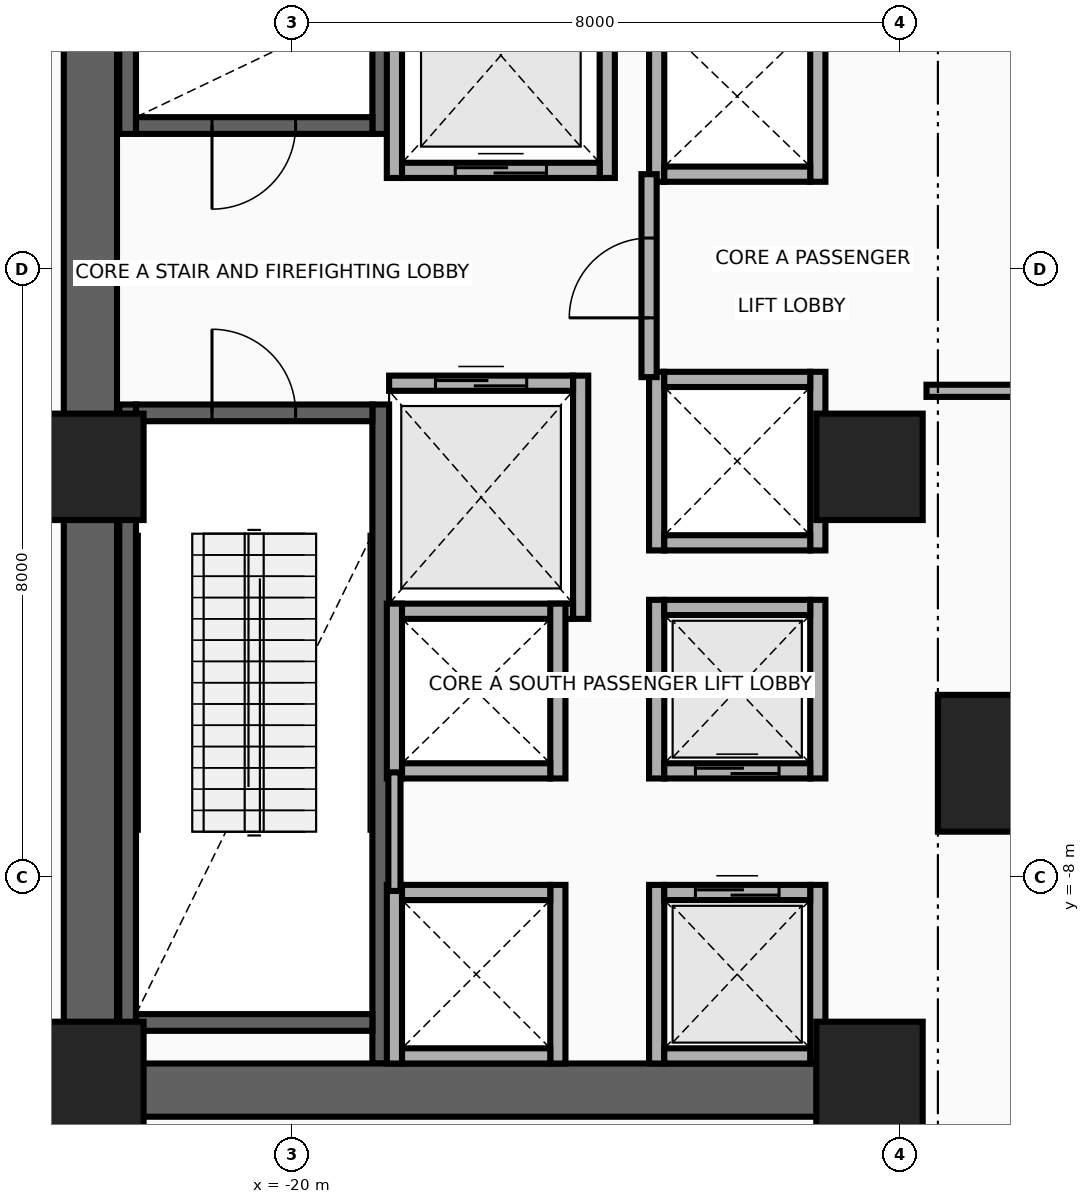
"""IFC4 building model, lengths in metres.
Left out: names, types, materials, properties, quantities, classifications, styles, units other than length and angle.
Written with IfcOpenShell. Run it as: python <this file> out.ifc"""

import sys

from ifc_helpers import new_model, si_unit, direction, frame, frame_2d, origin, origin_2d, place, context, subcontext, project, spatial, rectangle, extrude, source, transform, mapped, element, fill, save


model = new_model("IFC4")
c1 = context("Model", 3, precision=1e-05, world=origin(), true_north=direction((0.0, 1.0)))
c2 = subcontext(c1, "Body", "Model", "MODEL_VIEW")
j1 = project(units=[si_unit("LENGTHUNIT", "METRE"), si_unit("PLANEANGLEUNIT", "RADIAN")], contexts=[c1])
p1 = place(None, origin())
s1 = spatial("IfcSite", under=j1, at=p1, CompositionType="ELEMENT")
p2 = place(p1, origin())
s2 = spatial("IfcBuilding", under=s1, at=p2, CompositionType="ELEMENT")
p3 = place(p2, frame((0.0, 0.0, 20.8)))
s3 = spatial("IfcBuildingStorey", under=s2, at=p3, CompositionType="ELEMENT", Elevation=20.8)
for number, where, z_axis, x_axis in (
    (1, (-22.16, 1.78, 0.0), (0.0, 0.0, 1.0), (0.0, 1.0, 0.0)),
    (2, (-18.83, 1.78, 0.0), (0.0, 0.0, 1.0), (0.0, 1.0, 0.0)),
):
    element("IfcWall", number, at=place(p3, frame(where, z_axis=z_axis, x_axis=x_axis)), inside=s3, PredefinedType="SHEAR", context=c2, shape_type="SweptSolid", body=[
        extrude(rectangle(XDim=8.67, YDim=0.22, at=frame_2d((4.335, 0.0))), origin(), (0.0, 0.0, 1.0), 4.96),
    ])
p4 = place(p3, frame((-22.05, 1.89, 0.0), z_axis=(0.0, 0.0, 1.0), x_axis=(1.0, 0.0, 0.0)))
e3 = element("IfcWall", 3, at=p4, inside=s3, PredefinedType="SHEAR", context=c2, shape_type="SweptSolid", body=[
    extrude(rectangle(XDim=3.11, YDim=0.22, at=frame_2d((1.555, 0.0))), origin(), (0.0, 0.0, 1.0), 4.96),
])
p5 = place(p4, frame((1.0, 0.0, 0.0)))
e4 = element("IfcOpeningElement", 4, at=p5, cuts=e3, PredefinedType="OPENING", context=c2, shape_type="SweptSolid", body=[
    extrude(rectangle(XDim=1.1, YDim=2.15, at=frame_2d((0.55, 1.075))), frame((0.0, 0.125, 0.0), z_axis=(0.0, -1.0, 0.0), x_axis=(1.0, 0.0, 0.0)), (0.0, 0.0, 1.0), 0.25),
])
for number, where, z_axis, x_axis in (
    (5, (-22.16, -10.45, 0.0), (0.0, 0.0, 1.0), (0.0, 1.0, 0.0)),
    (6, (-18.83, -10.45, 0.0), (0.0, 0.0, 1.0), (0.0, 1.0, 0.0)),
):
    element("IfcWall", number, at=place(p3, frame(where, z_axis=z_axis, x_axis=x_axis)), inside=s3, PredefinedType="SHEAR", context=c2, shape_type="SweptSolid", body=[
        extrude(rectangle(XDim=8.67, YDim=0.22, at=frame_2d((4.335, 0.0))), origin(), (0.0, 0.0, 1.0), 4.96),
    ])
p6 = place(p3, frame((-22.05, -9.91, 0.0), z_axis=(0.0, 0.0, 1.0), x_axis=(1.0, 0.0, 0.0)))
e7 = element("IfcWall", 7, at=p6, inside=s3, PredefinedType="SHEAR", context=c2, shape_type="SweptSolid", body=[
    extrude(rectangle(XDim=3.11, YDim=0.22, at=frame_2d((1.555, 0.0))), origin(), (0.0, 0.0, 1.0), 4.96),
])
p7 = place(p3, frame((-22.05, -1.89, 0.0), z_axis=(0.0, 0.0, 1.0), x_axis=(1.0, 0.0, 0.0)))
e8 = element("IfcWall", 8, at=p7, inside=s3, PredefinedType="SHEAR", context=c2, shape_type="SweptSolid", body=[
    extrude(rectangle(XDim=3.11, YDim=0.22, at=frame_2d((1.555, 0.0))), origin(), (0.0, 0.0, 1.0), 4.96),
])
p8 = place(p7, frame((1.0, 0.0, 0.0)))
e9 = element("IfcOpeningElement", 9, at=p8, cuts=e8, PredefinedType="OPENING", context=c2, shape_type="SweptSolid", body=[
    extrude(rectangle(XDim=1.1, YDim=2.15, at=frame_2d((0.55, 1.075))), frame((0.0, 0.125, 0.0), z_axis=(0.0, -1.0, 0.0), x_axis=(1.0, 0.0, 0.0)), (0.0, 0.0, 1.0), 0.25),
])
p9 = place(p3, frame((-22.65, -11.15, 0.0), z_axis=(0.0, 0.0, 1.0), x_axis=(0.0, 1.0, 0.0)))
e10 = element("IfcWall", 10, at=p9, inside=s3, PredefinedType="SHEAR", context=c2, shape_type="SweptSolid", body=[
    extrude(rectangle(XDim=22.3, YDim=0.7, at=frame_2d((11.15, 0.0))), origin(), (0.0, 0.0, 1.0), 4.96),
])
p10 = place(p3, frame((-22.65, -10.8, 0.0), z_axis=(0.0, 0.0, 1.0), x_axis=(1.0, 0.0, 0.0)))
e11 = element("IfcWall", 11, at=p10, inside=s3, PredefinedType="SHEAR", context=c2, shape_type="SweptSolid", body=[
    extrude(rectangle(XDim=10.25, YDim=0.7, at=frame_2d((5.125, 0.0))), origin(), (0.0, 0.0, 1.0), 4.96),
])
m1 = source(origin(), c2, "Body", "SweptSolid", [
    extrude(rectangle(XDim=1.4, YDim=1.4, at=origin_2d()), origin(), (0.0, 0.0, 1.0), 5.2),
])
for number, where, z_axis, x_axis in (
    (12, (-22.65, -10.6, 0.0), (0.0, 0.0, 1.0), (1.0, 0.0, 0.0)),
    (13, (-12.4, -10.6, 0.0), (0.0, 0.0, 1.0), (1.0, 0.0, 0.0)),
    (14, (-22.65, -2.6, 0.0), (0.0, 0.0, 1.0), (1.0, 0.0, 0.0)),
    (15, (-12.4, -2.6, 0.0), (0.0, 0.0, 1.0), (1.0, 0.0, 0.0)),
):
    element("IfcColumn", number, at=place(p3, frame(where, z_axis=z_axis, x_axis=x_axis)), inside=s3, PredefinedType="COLUMN", context=c2, shape_type="MappedRepresentation", body=[
        mapped(m1, transform((0.0, 0.0, 0.0), x_axis=(1.0, 0.0, 0.0), y_axis=(0.0, 1.0, 0.0), z_axis=(0.0, 0.0, 1.0), scale=1.0)),
    ])
m2 = source(origin(), c2, "Body", "SweptSolid", [
    extrude(rectangle(XDim=1.8, YDim=1.8, at=origin_2d()), origin(), (0.0, 0.0, 1.0), 5.2),
])
p11 = place(p3, frame((-10.6, -6.5, 0.0), z_axis=(0.0, 0.0, 1.0), x_axis=(1.0, 0.0, 0.0)))
e16 = element("IfcColumn", 16, at=p11, inside=s3, PredefinedType="COLUMN", context=c2, shape_type="MappedRepresentation", body=[
    mapped(m2, transform((0.0, 0.0, 0.0), x_axis=(1.0, 0.0, 0.0), y_axis=(0.0, 1.0, 0.0), z_axis=(0.0, 0.0, 1.0), scale=1.0)),
])
for number, where, z_axis, x_axis in (
    (17, (-18.65, 1.2, 0.0), (0.0, 0.0, 1.0), (0.0, 1.0, 0.0)),
    (18, (-15.85, 1.2, 0.0), (0.0, 0.0, 1.0), (0.0, 1.0, 0.0)),
):
    element("IfcWall", number, at=place(p3, frame(where, z_axis=z_axis, x_axis=x_axis)), inside=s3, PredefinedType="MOVABLE", context=c2, shape_type="SweptSolid", body=[
        extrude(rectangle(XDim=3.225, YDim=0.2, at=frame_2d((1.613, 0.0))), origin(), (0.0, 0.0, 1.0), 4.96),
    ])
p12 = place(p3, frame((-18.55, 1.3, 0.0), z_axis=(0.0, 0.0, 1.0), x_axis=(1.0, 0.0, 0.0)))
e19 = element("IfcWall", 19, at=p12, inside=s3, PredefinedType="MOVABLE", context=c2, shape_type="SweptSolid", body=[
    extrude(rectangle(XDim=2.6, YDim=0.2, at=frame_2d((1.3, 0.0))), origin(), (0.0, 0.0, 1.0), 4.96),
])
p13 = place(p12, frame((0.7, 0.0, 0.0)))
e20 = element("IfcOpeningElement", 20, at=p13, cuts=e19, PredefinedType="OPENING", context=c2, shape_type="SweptSolid", body=[
    extrude(rectangle(XDim=1.2, YDim=2.1, at=frame_2d((0.6, 1.05))), frame((0.0, 0.115, 0.0), z_axis=(0.0, -1.0, 0.0), x_axis=(1.0, 0.0, 0.0)), (0.0, 0.0, 1.0), 0.23),
])
p14 = place(p3, frame((-16.2, -4.6, 0.0), z_axis=(0.0, 0.0, 1.0), x_axis=(0.0, 1.0, 0.0)))
e21 = element("IfcWall", 21, at=p14, inside=s3, PredefinedType="MOVABLE", context=c2, shape_type="SweptSolid", body=[
    extrude(rectangle(XDim=3.2, YDim=0.2, at=frame_2d((1.6, 0.0))), origin(), (0.0, 0.0, 1.0), 4.96),
])
p15 = place(p3, frame((-18.72, -4.5, 0.0), z_axis=(0.0, 0.0, 1.0), x_axis=(1.0, 0.0, 0.0)))
e22 = element("IfcWall", 22, at=p15, inside=s3, PredefinedType="MOVABLE", context=c2, shape_type="SweptSolid", body=[
    extrude(rectangle(XDim=2.42, YDim=0.2, at=frame_2d((1.21, 0.0))), origin(), (0.0, 0.0, 1.0), 4.96),
])
p16 = place(p3, frame((-18.72, -1.5, 0.0), z_axis=(0.0, 0.0, 1.0), x_axis=(1.0, 0.0, 0.0)))
e23 = element("IfcWall", 23, at=p16, inside=s3, PredefinedType="MOVABLE", context=c2, shape_type="SweptSolid", body=[
    extrude(rectangle(XDim=2.42, YDim=0.2, at=frame_2d((1.21, 0.0))), origin(), (0.0, 0.0, 1.0), 4.96),
])
p17 = place(p16, frame((0.61, 0.0, 0.0)))
e24 = element("IfcOpeningElement", 24, at=p17, cuts=e23, PredefinedType="OPENING", context=c2, shape_type="SweptSolid", body=[
    extrude(rectangle(XDim=1.2, YDim=2.1, at=frame_2d((0.6, 1.05))), frame((0.0, 0.115, 0.0), z_axis=(0.0, -1.0, 0.0), x_axis=(1.0, 0.0, 0.0)), (0.0, 0.0, 1.0), 0.23),
])
for number, where, z_axis, x_axis in (
    (25, (-15.2, -10.45, 0.0), (0.0, 0.0, 1.0), (0.0, 1.0, 0.0)),
    (26, (-13.08, -10.45, 0.0), (0.0, 0.0, 1.0), (0.0, 1.0, 0.0)),
):
    element("IfcWall", number, at=place(p3, frame(where, z_axis=z_axis, x_axis=x_axis)), inside=s3, PredefinedType="MOVABLE", context=c2, shape_type="SweptSolid", body=[
        extrude(rectangle(XDim=2.35, YDim=0.2, at=frame_2d((1.175, 0.0))), origin(), (0.0, 0.0, 1.0), 3.745),
    ])
p18 = place(p3, frame((-15.1, -10.35, 0.0), z_axis=(0.0, 0.0, 1.0), x_axis=(1.0, 0.0, 0.0)))
e27 = element("IfcWall", 27, at=p18, inside=s3, PredefinedType="MOVABLE", context=c2, shape_type="SweptSolid", body=[
    extrude(rectangle(XDim=1.92, YDim=0.2, at=frame_2d((0.96, 0.0))), origin(), (0.0, 0.0, 1.0), 3.745),
])
p19 = place(p3, frame((-15.1, -8.2, 0.0), z_axis=(0.0, 0.0, 1.0), x_axis=(1.0, 0.0, 0.0)))
e28 = element("IfcWall", 28, at=p19, inside=s3, PredefinedType="MOVABLE", context=c2, shape_type="SweptSolid", body=[
    extrude(rectangle(XDim=1.92, YDim=0.2, at=frame_2d((0.96, 0.0))), origin(), (0.0, 0.0, 1.0), 4.96),
])
p20 = place(p19, frame((0.41, 0.0, 0.0)))
e29 = element("IfcOpeningElement", 29, at=p20, cuts=e28, PredefinedType="OPENING", context=c2, shape_type="SweptSolid", body=[
    extrude(rectangle(XDim=1.1, YDim=2.1, at=frame_2d((0.55, 1.05))), frame((0.0, 0.115, 0.0), z_axis=(0.0, -1.0, 0.0), x_axis=(1.0, 0.0, 0.0)), (0.0, 0.0, 1.0), 0.23),
])
for number, where, z_axis, x_axis in (
    (30, (-15.2, -6.7, 0.0), (0.0, 0.0, 1.0), (0.0, 1.0, 0.0)),
    (31, (-13.08, -6.7, 0.0), (0.0, 0.0, 1.0), (0.0, 1.0, 0.0)),
):
    element("IfcWall", number, at=place(p3, frame(where, z_axis=z_axis, x_axis=x_axis)), inside=s3, PredefinedType="MOVABLE", context=c2, shape_type="SweptSolid", body=[
        extrude(rectangle(XDim=2.35, YDim=0.2, at=frame_2d((1.175, 0.0))), origin(), (0.0, 0.0, 1.0), 4.96),
    ])
p21 = place(p3, frame((-15.1, -6.6, 0.0), z_axis=(0.0, 0.0, 1.0), x_axis=(1.0, 0.0, 0.0)))
e32 = element("IfcWall", 32, at=p21, inside=s3, PredefinedType="MOVABLE", context=c2, shape_type="SweptSolid", body=[
    extrude(rectangle(XDim=1.92, YDim=0.2, at=frame_2d((0.96, 0.0))), origin(), (0.0, 0.0, 1.0), 4.96),
])
p22 = place(p21, frame((0.41, 0.0, 0.0)))
e33 = element("IfcOpeningElement", 33, at=p22, cuts=e32, PredefinedType="OPENING", context=c2, shape_type="SweptSolid", body=[
    extrude(rectangle(XDim=1.1, YDim=2.1, at=frame_2d((0.55, 1.05))), frame((0.0, 0.115, 0.0), z_axis=(0.0, -1.0, 0.0), x_axis=(1.0, 0.0, 0.0)), (0.0, 0.0, 1.0), 0.23),
])
p23 = place(p3, frame((-15.1, -4.45, 0.0), z_axis=(0.0, 0.0, 1.0), x_axis=(1.0, 0.0, 0.0)))
e34 = element("IfcWall", 34, at=p23, inside=s3, PredefinedType="MOVABLE", context=c2, shape_type="SweptSolid", body=[
    extrude(rectangle(XDim=1.92, YDim=0.2, at=frame_2d((0.96, 0.0))), origin(), (0.0, 0.0, 1.0), 4.96),
])
for number, where, z_axis, x_axis in (
    (35, (-18.65, -10.45, 0.0), (0.0, 0.0, 1.0), (0.0, 1.0, 0.0)),
    (36, (-16.5, -10.45, 0.0), (0.0, 0.0, 1.0), (0.0, 1.0, 0.0)),
):
    element("IfcWall", number, at=place(p3, frame(where, z_axis=z_axis, x_axis=x_axis)), inside=s3, PredefinedType="MOVABLE", context=c2, shape_type="SweptSolid", body=[
        extrude(rectangle(XDim=2.35, YDim=0.2, at=frame_2d((1.175, 0.0))), origin(), (0.0, 0.0, 1.0), 3.745),
    ])
p24 = place(p3, frame((-18.55, -10.35, 0.0), z_axis=(0.0, 0.0, 1.0), x_axis=(1.0, 0.0, 0.0)))
e37 = element("IfcWall", 37, at=p24, inside=s3, PredefinedType="MOVABLE", context=c2, shape_type="SweptSolid", body=[
    extrude(rectangle(XDim=1.95, YDim=0.2, at=frame_2d((0.975, 0.0))), origin(), (0.0, 0.0, 1.0), 3.745),
])
p25 = place(p3, frame((-18.55, -8.2, 0.0), z_axis=(0.0, 0.0, 1.0), x_axis=(1.0, 0.0, 0.0)))
e38 = element("IfcWall", 38, at=p25, inside=s3, PredefinedType="MOVABLE", context=c2, shape_type="SweptSolid", body=[
    extrude(rectangle(XDim=1.95, YDim=0.2, at=frame_2d((0.975, 0.0))), origin(), (0.0, 0.0, 1.0), 4.96),
])
for number, where, z_axis, x_axis in (
    (39, (-15.2, 1.15, 0.0), (0.0, 0.0, 1.0), (0.0, 1.0, 0.0)),
    (40, (-13.08, 1.15, 0.0), (0.0, 0.0, 1.0), (0.0, 1.0, 0.0)),
):
    element("IfcWall", number, at=place(p3, frame(where, z_axis=z_axis, x_axis=x_axis)), inside=s3, PredefinedType="MOVABLE", context=c2, shape_type="SweptSolid", body=[
        extrude(rectangle(XDim=2.25, YDim=0.2, at=frame_2d((1.125, 0.0))), origin(), (0.0, 0.0, 1.0), 4.96),
    ])
p26 = place(p3, frame((-15.1, 1.25, 0.0), z_axis=(0.0, 0.0, 1.0), x_axis=(1.0, 0.0, 0.0)))
e41 = element("IfcWall", 41, at=p26, inside=s3, PredefinedType="MOVABLE", context=c2, shape_type="SweptSolid", body=[
    extrude(rectangle(XDim=1.92, YDim=0.2, at=frame_2d((0.96, 0.0))), origin(), (0.0, 0.0, 1.0), 4.96),
])
for number, where, z_axis, x_axis in (
    (42, (-18.65, -6.7, 0.0), (0.0, 0.0, 1.0), (0.0, 1.0, 0.0)),
    (43, (-16.5, -6.7, 0.0), (0.0, 0.0, 1.0), (0.0, 1.0, 0.0)),
):
    element("IfcWall", number, at=place(p3, frame(where, z_axis=z_axis, x_axis=x_axis)), inside=s3, PredefinedType="MOVABLE", context=c2, shape_type="SweptSolid", body=[
        extrude(rectangle(XDim=2.3, YDim=0.2, at=frame_2d((1.15, 0.0))), origin(), (0.0, 0.0, 1.0), 4.96),
    ])
p27 = place(p3, frame((-18.55, -6.6, 0.0), z_axis=(0.0, 0.0, 1.0), x_axis=(1.0, 0.0, 0.0)))
e44 = element("IfcWall", 44, at=p27, inside=s3, PredefinedType="MOVABLE", context=c2, shape_type="SweptSolid", body=[
    extrude(rectangle(XDim=1.95, YDim=0.2, at=frame_2d((0.975, 0.0))), origin(), (0.0, 0.0, 1.0), 4.96),
])
for number, where, z_axis, x_axis in (
    (45, (-15.2, -3.7, 0.0), (0.0, 0.0, 1.0), (0.0, 1.0, 0.0)),
    (46, (-13.08, -3.7, 0.0), (0.0, 0.0, 1.0), (0.0, 1.0, 0.0)),
):
    element("IfcWall", number, at=place(p3, frame(where, z_axis=z_axis, x_axis=x_axis)), inside=s3, PredefinedType="MOVABLE", context=c2, shape_type="SweptSolid", body=[
        extrude(rectangle(XDim=2.35, YDim=0.2, at=frame_2d((1.175, 0.0))), origin(), (0.0, 0.0, 1.0), 4.96),
    ])
for number, where, z_axis, x_axis in (
    (47, (-15.1, -3.6, 0.0), (0.0, 0.0, 1.0), (1.0, 0.0, 0.0)),
    (48, (-15.1, -1.45, 0.0), (0.0, 0.0, 1.0), (1.0, 0.0, 0.0)),
):
    element("IfcWall", number, at=place(p3, frame(where, z_axis=z_axis, x_axis=x_axis)), inside=s3, PredefinedType="MOVABLE", context=c2, shape_type="SweptSolid", body=[
        extrude(rectangle(XDim=1.92, YDim=0.2, at=frame_2d((0.96, 0.0))), origin(), (0.0, 0.0, 1.0), 4.96),
    ])
p28 = place(p3, frame((-15.3, -1.42, 0.0), z_axis=(0.0, 0.0, 1.0), x_axis=(0.0, 1.0, 0.0)))
e49 = element("IfcWall", 49, at=p28, inside=s3, PredefinedType="PARTITIONING", context=c2, shape_type="SweptSolid", body=[
    extrude(rectangle(XDim=2.67, YDim=0.2, at=frame_2d((1.335, 0.0))), origin(), (0.0, 0.0, 1.0), 4.96),
])
p29 = place(p28, frame((0.78, 0.0, 0.0)))
e50 = element("IfcOpeningElement", 50, at=p29, cuts=e49, PredefinedType="OPENING", context=c2, shape_type="SweptSolid", body=[
    extrude(rectangle(XDim=1.05, YDim=2.15, at=frame_2d((0.525, 1.075))), frame((0.0, 0.115, 0.0), z_axis=(0.0, -1.0, 0.0), x_axis=(1.0, 0.0, 0.0)), (0.0, 0.0, 1.0), 0.23),
])
p30 = place(p3, frame((-18.65, -8.18, 0.0), z_axis=(0.0, 0.0, 1.0), x_axis=(0.0, 1.0, 0.0)))
e51 = element("IfcWall", 51, at=p30, inside=s3, PredefinedType="PARTITIONING", context=c2, shape_type="SweptSolid", body=[
    extrude(rectangle(XDim=1.56, YDim=0.16, at=frame_2d((0.78, 0.0))), origin(), (0.0, 0.0, 1.0), 4.96),
])
p31 = place(p3, frame((-11.65, -1.6, 0.0), z_axis=(0.0, 0.0, 1.0), x_axis=(1.0, 0.0, 0.0)))
e52 = element("IfcWall", 52, at=p31, inside=s3, PredefinedType="PARTITIONING", context=c2, shape_type="SweptSolid", body=[
    extrude(rectangle(XDim=1.85, YDim=0.16, at=frame_2d((0.925, 0.0))), origin(), (0.0, 0.0, 1.0), 4.96),
])
p32 = place(p13, origin())
e53 = element("IfcDoor", 53, at=p32, inside=s3, OperationType="DOUBLE_DOOR_SLIDING", PredefinedType="DOOR", context=c2, shape_type="SweptSolid", body=[
    extrude(rectangle(XDim=1.2, YDim=2.1, at=frame_2d((0.6, 1.05))), frame((0.0, 0.025, 0.0), z_axis=(0.0, -1.0, 0.0), x_axis=(1.0, 0.0, 0.0)), (0.0, 0.0, 1.0), 0.05),
])
fill(e20, e53)
p33 = place(p17, origin())
e54 = element("IfcDoor", 54, at=p33, inside=s3, OperationType="DOUBLE_DOOR_SLIDING", PredefinedType="DOOR", context=c2, shape_type="SweptSolid", body=[
    extrude(rectangle(XDim=1.2, YDim=2.1, at=frame_2d((0.6, 1.05))), frame((0.0, 0.025, 0.0), z_axis=(0.0, -1.0, 0.0), x_axis=(1.0, 0.0, 0.0)), (0.0, 0.0, 1.0), 0.05),
])
fill(e24, e54)
p34 = place(p20, origin())
e55 = element("IfcDoor", 55, at=p34, inside=s3, OperationType="DOUBLE_DOOR_SLIDING", PredefinedType="DOOR", context=c2, shape_type="SweptSolid", body=[
    extrude(rectangle(XDim=1.1, YDim=2.1, at=frame_2d((0.55, 1.05))), frame((0.0, 0.025, 0.0), z_axis=(0.0, -1.0, 0.0), x_axis=(1.0, 0.0, 0.0)), (0.0, 0.0, 1.0), 0.05),
])
fill(e29, e55)
p35 = place(p22, origin())
e56 = element("IfcDoor", 56, at=p35, inside=s3, OperationType="DOUBLE_DOOR_SLIDING", PredefinedType="DOOR", context=c2, shape_type="SweptSolid", body=[
    extrude(rectangle(XDim=1.1, YDim=2.1, at=frame_2d((0.55, 1.05))), frame((0.0, 0.025, 0.0), z_axis=(0.0, -1.0, 0.0), x_axis=(1.0, 0.0, 0.0)), (0.0, 0.0, 1.0), 0.05),
])
fill(e33, e56)
p36 = place(p29, origin())
e57 = element("IfcDoor", 57, at=p36, inside=s3, OperationType="SINGLE_SWING_RIGHT", PredefinedType="DOOR", context=c2, shape_type="SweptSolid", body=[
    extrude(rectangle(XDim=1.05, YDim=2.15, at=frame_2d((0.525, 1.075))), frame((0.0, 0.025, 0.0), z_axis=(0.0, -1.0, 0.0), x_axis=(1.0, 0.0, 0.0)), (0.0, 0.0, 1.0), 0.05),
])
fill(e50, e57)
p37 = place(p5, frame((1.1, 0.0, 0.0), z_axis=(0.0, 0.0, 1.0), x_axis=(-1.0, 0.0, 0.0)))
e58 = element("IfcDoor", 58, at=p37, inside=s3, OperationType="SINGLE_SWING_LEFT", PredefinedType="DOOR", context=c2, shape_type="SweptSolid", body=[
    extrude(rectangle(XDim=1.1, YDim=2.15, at=frame_2d((0.55, 1.075))), frame((0.0, 0.025, 0.0), z_axis=(0.0, -1.0, 0.0), x_axis=(1.0, 0.0, 0.0)), (0.0, 0.0, 1.0), 0.05),
])
fill(e4, e58)
p38 = place(p8, origin())
e59 = element("IfcDoor", 59, at=p38, inside=s3, OperationType="SINGLE_SWING_RIGHT", PredefinedType="DOOR", context=c2, shape_type="SweptSolid", body=[
    extrude(rectangle(XDim=1.1, YDim=2.15, at=frame_2d((0.55, 1.075))), frame((0.0, 0.025, 0.0), z_axis=(0.0, -1.0, 0.0), x_axis=(1.0, 0.0, 0.0)), (0.0, 0.0, 1.0), 0.05),
])
fill(e9, e59)
save(model, sys.argv[1])
